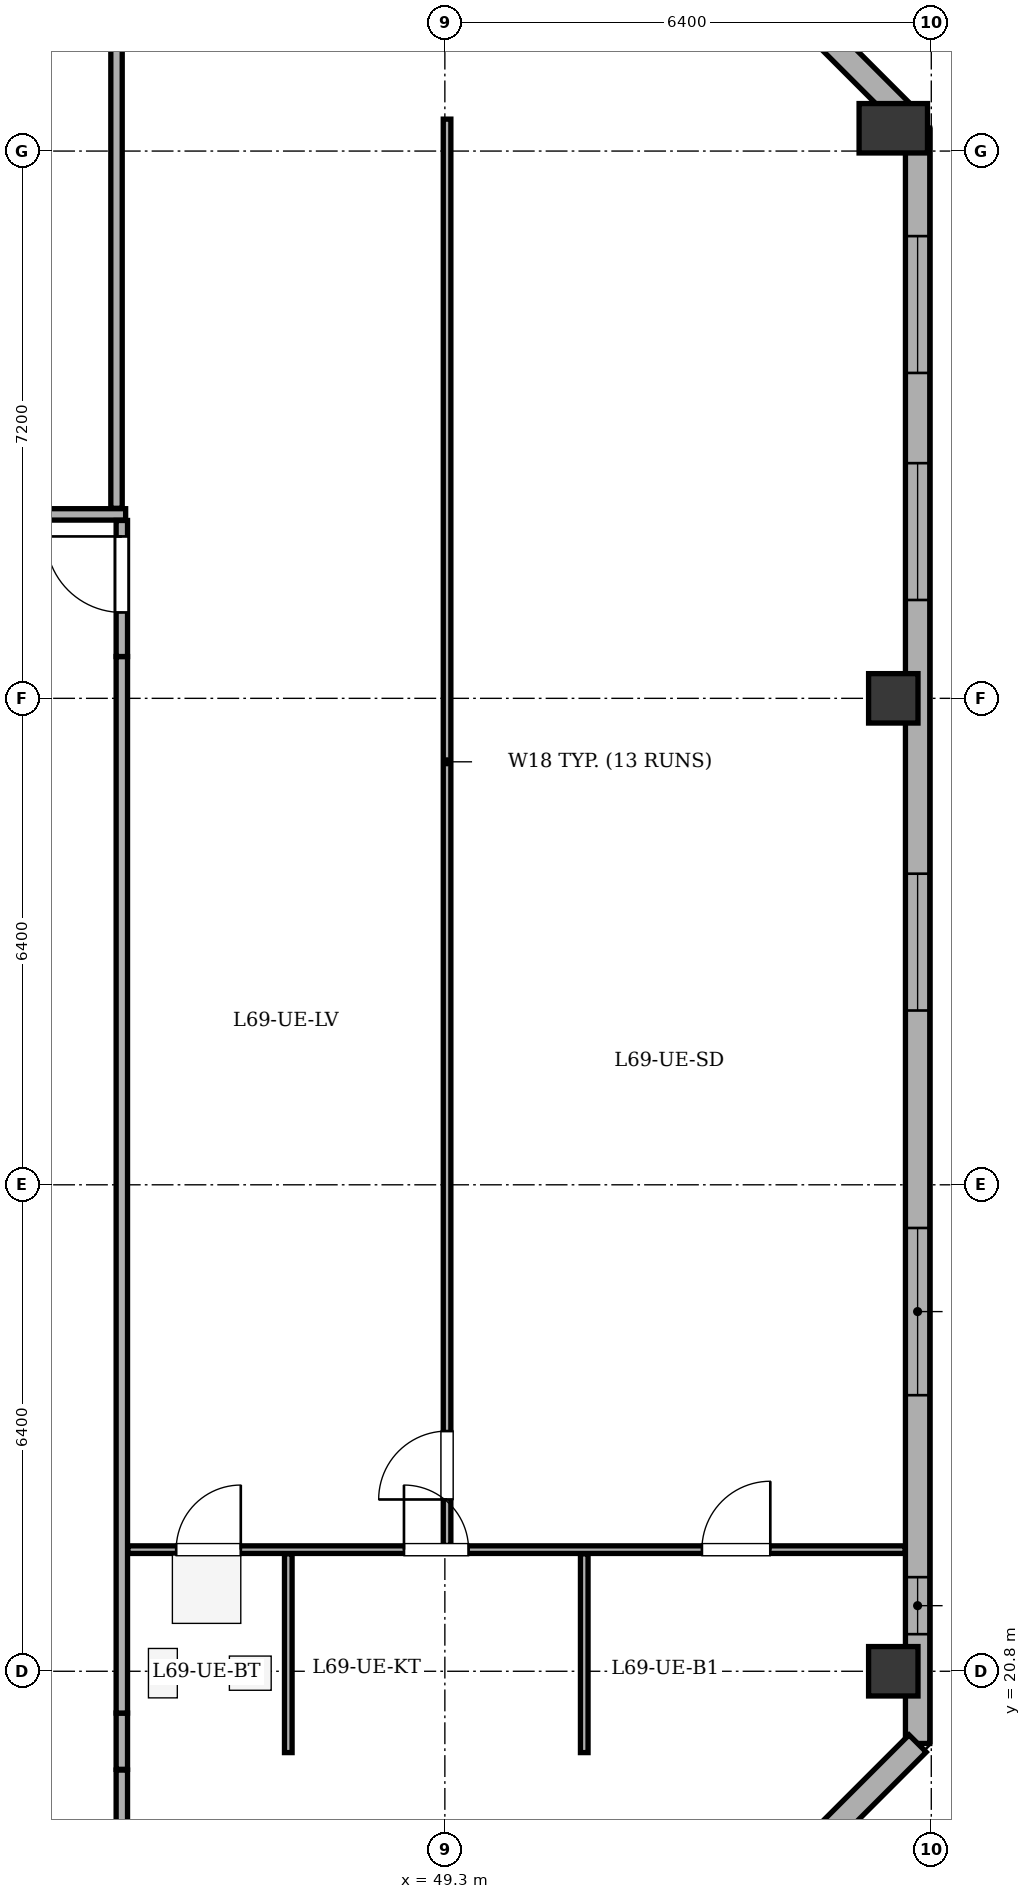
"""IFC4 building model, lengths in metres.
Left out: names, types, materials, properties, quantities, classifications, styles, units other than length and angle.
Written with IfcOpenShell. Run it as: python <this file> out.ifc"""

import sys

from ifc_helpers import new_model, si_unit, direction, frame, frame_2d, origin, origin_2d, place, context, subcontext, project, spatial, rectangle, extrude, element, fill, save


model = new_model("IFC4")
c1 = context("Model", 3, precision=1e-05, world=origin(), true_north=direction((0.0, 1.0)))
c2 = subcontext(c1, "Body", "Model", "MODEL_VIEW")
j1 = project(units=[si_unit("LENGTHUNIT", "METRE"), si_unit("PLANEANGLEUNIT", "RADIAN")], contexts=[c1])
p1 = place(None, origin())
s1 = spatial("IfcSite", under=j1, at=p1, CompositionType="ELEMENT")
p2 = place(p1, origin())
s2 = spatial("IfcBuilding", under=s1, at=p2, CompositionType="ELEMENT")
p3 = place(p2, frame((0.0, 0.0, 261.9)))
s3 = spatial("IfcBuildingStorey", under=s2, at=p3, CompositionType="ELEMENT", Elevation=261.9)
for number, where, z_axis, x_axis in (
    (1, (55.2, 20.8, 0.0), (0.0, 0.0, 1.0), (1.0, 0.0, 0.0)),
    (2, (55.2, 33.6, 0.0), (0.0, 0.0, 1.0), (1.0, 0.0, 0.0)),
):
    element("IfcColumn", number, at=place(p3, frame(where, z_axis=z_axis, x_axis=x_axis)), inside=s3, PredefinedType="COLUMN", context=c2, shape_type="SweptSolid", body=[
        extrude(rectangle(XDim=0.65, YDim=0.65, at=origin_2d()), origin(), (0.0, 0.0, 1.0), 3.4),
    ])
p4 = place(p3, frame((55.2, 41.1, 0.0), z_axis=(0.0, 0.0, 1.0), x_axis=(1.0, 0.0, 0.0)))
e3 = element("IfcColumn", 3, at=p4, inside=s3, PredefinedType="COLUMN", context=c2, shape_type="SweptSolid", body=[
    extrude(rectangle(XDim=0.65, YDim=0.9, at=origin_2d()), origin(), (0.0, 0.0, 1.0), 3.4),
])
p5 = place(p3, frame((51.7, 44.92, 0.0), z_axis=(0.0, 0.0, 1.0), x_axis=(0.70712937715, -0.707084184501, 0.0)))
e4 = element("IfcWall", 4, at=p5, inside=s3, PredefinedType="STANDARD", context=c2, shape_type="SweptSolid", body=[
    extrude(rectangle(XDim=5.402, YDim=0.32, at=frame_2d((2.701, 0.0))), origin(), (0.0, 0.0, 1.0), 2.725),
])
p6 = place(p5, frame((2.001, 0.0, 0.75)))
e5 = element("IfcOpeningElement", 5, at=p6, cuts=e4, PredefinedType="OPENING", context=c2, shape_type="SweptSolid", body=[
    extrude(rectangle(XDim=1.4, YDim=1.65, at=frame_2d((0.7, 0.825))), frame((0.0, 0.17, 0.0), z_axis=(0.0, -1.0, 0.0), x_axis=(1.0, 0.0, 0.0)), (0.0, 0.0, 1.0), 0.34),
])
p7 = place(p3, frame((55.52, 41.1, 0.0), z_axis=(0.0, 0.0, 1.0), x_axis=(0.0, -1.0, 0.0)))
e6 = element("IfcWall", 6, at=p7, inside=s3, PredefinedType="STANDARD", context=c2, shape_type="SweptSolid", body=[
    extrude(rectangle(XDim=21.25, YDim=0.32, at=frame_2d((10.625, 0.0))), origin(), (0.0, 0.0, 1.0), 2.725),
])
p8 = place(p7, frame((1.419, 0.0, 0.75)))
e7 = element("IfcOpeningElement", 7, at=p8, cuts=e6, PredefinedType="OPENING", context=c2, shape_type="SweptSolid", body=[
    extrude(rectangle(XDim=1.8, YDim=1.7, at=frame_2d((0.9, 0.85))), frame((0.0, 0.17, 0.0), z_axis=(0.0, -1.0, 0.0), x_axis=(1.0, 0.0, 0.0)), (0.0, 0.0, 1.0), 0.34),
])
p9 = place(p7, frame((4.406, 0.0, 0.75)))
e8 = element("IfcOpeningElement", 8, at=p9, cuts=e6, PredefinedType="OPENING", context=c2, shape_type="SweptSolid", body=[
    extrude(rectangle(XDim=1.8, YDim=1.7, at=frame_2d((0.9, 0.85))), frame((0.0, 0.17, 0.0), z_axis=(0.0, -1.0, 0.0), x_axis=(1.0, 0.0, 0.0)), (0.0, 0.0, 1.0), 0.34),
])
p10 = place(p7, frame((9.807, 0.0, 0.75)))
e9 = element("IfcOpeningElement", 9, at=p10, cuts=e6, PredefinedType="OPENING", context=c2, shape_type="SweptSolid", body=[
    extrude(rectangle(XDim=1.8, YDim=1.7, at=frame_2d((0.9, 0.85))), frame((0.0, 0.17, 0.0), z_axis=(0.0, -1.0, 0.0), x_axis=(1.0, 0.0, 0.0)), (0.0, 0.0, 1.0), 0.34),
])
p11 = place(p7, frame((14.468, 0.0, 0.75)))
e10 = element("IfcOpeningElement", 10, at=p11, cuts=e6, PredefinedType="OPENING", context=c2, shape_type="SweptSolid", body=[
    extrude(rectangle(XDim=2.2, YDim=1.7, at=frame_2d((1.1, 0.85))), frame((0.0, 0.17, 0.0), z_axis=(0.0, -1.0, 0.0), x_axis=(1.0, 0.0, 0.0)), (0.0, 0.0, 1.0), 0.34),
])
p12 = place(p7, frame((19.062, 0.0, 0.75)))
e11 = element("IfcOpeningElement", 11, at=p12, cuts=e6, PredefinedType="OPENING", context=c2, shape_type="SweptSolid", body=[
    extrude(rectangle(XDim=0.75, YDim=1.45, at=frame_2d((0.375, 0.725))), frame((0.0, 0.17, 0.0), z_axis=(0.0, -1.0, 0.0), x_axis=(1.0, 0.0, 0.0)), (0.0, 0.0, 1.0), 0.34),
])
p13 = place(p3, frame((55.52, 19.85, 0.0), z_axis=(0.0, 0.0, 1.0), x_axis=(-0.707106781187, -0.707106781187, 0.0)))
e12 = element("IfcWall", 12, at=p13, inside=s3, PredefinedType="STANDARD", context=c2, shape_type="SweptSolid", body=[
    extrude(rectangle(XDim=5.402, YDim=0.32, at=frame_2d((2.701, 0.0))), origin(), (0.0, 0.0, 1.0), 2.725),
])
p14 = place(p13, frame((2.001, 0.0, 0.75)))
e13 = element("IfcOpeningElement", 13, at=p14, cuts=e12, PredefinedType="OPENING", context=c2, shape_type="SweptSolid", body=[
    extrude(rectangle(XDim=1.4, YDim=1.65, at=frame_2d((0.7, 0.825))), frame((0.0, 0.17, 0.0), z_axis=(0.0, -1.0, 0.0), x_axis=(1.0, 0.0, 0.0)), (0.0, 0.0, 1.0), 0.34),
])
p15 = place(p3, frame((14.58, 36.02, 0.0), z_axis=(0.0, 0.0, 1.0), x_axis=(1.0, 0.0, 0.0)))
e14 = element("IfcWall", 14, at=p15, inside=s3, PredefinedType="PARTITIONING", context=c2, shape_type="SweptSolid", body=[
    extrude(rectangle(XDim=30.52, YDim=0.15, at=frame_2d((15.26, 0.0))), origin(), (0.0, 0.0, 1.0), 3.1),
])
p16 = place(p15, frame((3.253, 0.0, 0.0)))
e15 = element("IfcOpeningElement", 15, at=p16, cuts=e14, PredefinedType="OPENING", context=c2, shape_type="SweptSolid", body=[
    extrude(rectangle(XDim=1.0, YDim=2.1, at=frame_2d((0.5, 1.05))), frame((0.0, 0.085, 0.0), z_axis=(0.0, -1.0, 0.0), x_axis=(1.0, 0.0, 0.0)), (0.0, 0.0, 1.0), 0.17),
])
p17 = place(p15, frame((10.823, 0.0, 0.0)))
e16 = element("IfcOpeningElement", 16, at=p17, cuts=e14, PredefinedType="OPENING", context=c2, shape_type="SweptSolid", body=[
    extrude(rectangle(XDim=1.0, YDim=2.1, at=frame_2d((0.5, 1.05))), frame((0.0, 0.085, 0.0), z_axis=(0.0, -1.0, 0.0), x_axis=(1.0, 0.0, 0.0)), (0.0, 0.0, 1.0), 0.17),
])
p18 = place(p15, frame((18.697, 0.0, 0.0)))
e17 = element("IfcOpeningElement", 17, at=p18, cuts=e14, PredefinedType="OPENING", context=c2, shape_type="SweptSolid", body=[
    extrude(rectangle(XDim=1.0, YDim=2.1, at=frame_2d((0.5, 1.05))), frame((0.0, 0.085, 0.0), z_axis=(0.0, -1.0, 0.0), x_axis=(1.0, 0.0, 0.0)), (0.0, 0.0, 1.0), 0.17),
])
p19 = place(p15, frame((26.267, 0.0, 0.0)))
e18 = element("IfcOpeningElement", 18, at=p19, cuts=e14, PredefinedType="OPENING", context=c2, shape_type="SweptSolid", body=[
    extrude(rectangle(XDim=1.0, YDim=2.1, at=frame_2d((0.5, 1.05))), frame((0.0, 0.085, 0.0), z_axis=(0.0, -1.0, 0.0), x_axis=(1.0, 0.0, 0.0)), (0.0, 0.0, 1.0), 0.17),
])
p20 = place(p3, frame((44.98, 36.1, 0.0), z_axis=(0.0, 0.0, 1.0), x_axis=(0.0, 1.0, 0.0)))
e19 = element("IfcWall", 19, at=p20, inside=s3, PredefinedType="PARTITIONING", context=c2, shape_type="SweptSolid", body=[
    extrude(rectangle(XDim=8.655, YDim=0.15, at=frame_2d((4.327, 0.0))), origin(), (0.0, 0.0, 1.0), 2.725),
])
p21 = place(p3, frame((45.05, 19.5, 0.0), z_axis=(0.0, 0.0, 1.0), x_axis=(0.0, -1.0, 0.0)))
e20 = element("IfcWall", 20, at=p21, inside=s3, PredefinedType="PARTITIONING", context=c2, shape_type="SweptSolid", body=[
    extrude(rectangle(XDim=0.96, YDim=0.15, at=frame_2d((0.48, 0.0))), origin(), (0.0, 0.0, 1.0), 2.725),
])
p22 = place(p3, frame((45.05, 19.51, 0.0), z_axis=(0.0, 0.0, 1.0), x_axis=(0.0, 1.0, 0.0)))
e21 = element("IfcWall", 21, at=p22, inside=s3, PredefinedType="PARTITIONING", context=c2, shape_type="SweptSolid", body=[
    extrude(rectangle(XDim=0.74, YDim=0.15, at=frame_2d((0.37, 0.0))), origin(), (0.0, 0.0, 1.0), 2.725),
])
p23 = place(p3, frame((45.05, 20.25, 0.0), z_axis=(0.0, 0.0, 1.0), x_axis=(0.0, 1.0, 0.0)))
e22 = element("IfcWall", 22, at=p23, inside=s3, PredefinedType="PARTITIONING", context=c2, shape_type="SweptSolid", body=[
    extrude(rectangle(XDim=13.9, YDim=0.15, at=frame_2d((6.95, 0.0))), origin(), (0.0, 0.0, 1.0), 2.725),
])
p24 = place(p3, frame((45.05, 34.15, 0.0), z_axis=(0.0, 0.0, 1.0), x_axis=(0.0, 1.0, 0.0)))
e23 = element("IfcWall", 23, at=p24, inside=s3, PredefinedType="PARTITIONING", context=c2, shape_type="SweptSolid", body=[
    extrude(rectangle(XDim=1.79, YDim=0.15, at=frame_2d((0.895, 0.0))), origin(), (0.0, 0.0, 1.0), 2.725),
])
p25 = place(p24, frame((0.58, 0.0, 0.0)))
e24 = element("IfcOpeningElement", 24, at=p25, cuts=e23, PredefinedType="OPENING", context=c2, shape_type="SweptSolid", body=[
    extrude(rectangle(XDim=1.0, YDim=2.1, at=frame_2d((0.5, 1.05))), frame((0.0, 0.085, 0.0), z_axis=(0.0, -1.0, 0.0), x_axis=(1.0, 0.0, 0.0)), (0.0, 0.0, 1.0), 0.17),
])
p26 = place(p3, frame((45.13, 22.4, 0.0), z_axis=(0.0, 0.0, 1.0), x_axis=(1.0, 0.0, 0.0)))
e25 = element("IfcWall", 25, at=p26, inside=s3, PredefinedType="PARTITIONING", context=c2, shape_type="SweptSolid", body=[
    extrude(rectangle(XDim=10.225, YDim=0.1, at=frame_2d((5.113, 0.0))), origin(), (0.0, 0.0, 1.0), 3.1),
])
p27 = place(p26, frame((0.635, 0.0, 0.0)))
e26 = element("IfcOpeningElement", 26, at=p27, cuts=e25, PredefinedType="OPENING", context=c2, shape_type="SweptSolid", body=[
    extrude(rectangle(XDim=0.85, YDim=2.05, at=frame_2d((0.425, 1.025))), frame((0.0, 0.06, 0.0), z_axis=(0.0, -1.0, 0.0), x_axis=(1.0, 0.0, 0.0)), (0.0, 0.0, 1.0), 0.12),
])
p28 = place(p26, frame((3.632, 0.0, 0.0)))
e27 = element("IfcOpeningElement", 27, at=p28, cuts=e25, PredefinedType="OPENING", context=c2, shape_type="SweptSolid", body=[
    extrude(rectangle(XDim=0.85, YDim=2.05, at=frame_2d((0.425, 1.025))), frame((0.0, 0.06, 0.0), z_axis=(0.0, -1.0, 0.0), x_axis=(1.0, 0.0, 0.0)), (0.0, 0.0, 1.0), 0.12),
])
p29 = place(p26, frame((7.552, 0.0, 0.0)))
e28 = element("IfcOpeningElement", 28, at=p29, cuts=e25, PredefinedType="OPENING", context=c2, shape_type="SweptSolid", body=[
    extrude(rectangle(XDim=0.9, YDim=2.05, at=frame_2d((0.45, 1.025))), frame((0.0, 0.06, 0.0), z_axis=(0.0, -1.0, 0.0), x_axis=(1.0, 0.0, 0.0)), (0.0, 0.0, 1.0), 0.12),
])
p30 = place(p3, frame((49.329, 22.455, 0.0), z_axis=(0.0, 0.0, 1.0), x_axis=(0.0, 1.0, 0.0)))
e29 = element("IfcWall", 29, at=p30, inside=s3, PredefinedType="PARTITIONING", context=c2, shape_type="SweptSolid", body=[
    extrude(rectangle(XDim=18.765, YDim=0.1, at=frame_2d((9.382, 0.0))), origin(), (0.0, 0.0, 1.0), 2.725),
])
p31 = place(p30, frame((0.605, 0.0, 0.0)))
e30 = element("IfcOpeningElement", 30, at=p31, cuts=e29, PredefinedType="OPENING", context=c2, shape_type="SweptSolid", body=[
    extrude(rectangle(XDim=0.9, YDim=2.05, at=frame_2d((0.45, 1.025))), frame((0.0, 0.06, 0.0), z_axis=(0.0, -1.0, 0.0), x_axis=(1.0, 0.0, 0.0)), (0.0, 0.0, 1.0), 0.12),
])
p32 = place(p3, frame((47.24, 19.73, 0.0), z_axis=(0.0, 0.0, 1.0), x_axis=(0.0, 1.0, 0.0)))
e31 = element("IfcWall", 31, at=p32, inside=s3, PredefinedType="PARTITIONING", context=c2, shape_type="SweptSolid", body=[
    extrude(rectangle(XDim=2.615, YDim=0.1, at=frame_2d((1.308, 0.0))), origin(), (0.0, 0.0, 1.0), 2.725),
])
p33 = place(p3, frame((51.134, 19.73, 0.0), z_axis=(0.0, 0.0, 1.0), x_axis=(0.0, 1.0, 0.0)))
e32 = element("IfcWall", 32, at=p33, inside=s3, PredefinedType="PARTITIONING", context=c2, shape_type="SweptSolid", body=[
    extrude(rectangle(XDim=2.615, YDim=0.1, at=frame_2d((1.308, 0.0))), origin(), (0.0, 0.0, 1.0), 3.1),
])
p34 = place(p8, origin())
e33 = element("IfcWindow", 33, at=p34, inside=s3, PartitioningType="SINGLE_PANEL", PredefinedType="WINDOW", context=c2, shape_type="SweptSolid", body=[
    extrude(rectangle(XDim=1.8, YDim=1.7, at=frame_2d((0.9, 0.85))), frame((0.0, -0.01, 0.0), z_axis=(0.0, -1.0, 0.0), x_axis=(1.0, 0.0, 0.0)), (0.0, 0.0, 1.0), 0.06),
])
fill(e7, e33)
p35 = place(p9, origin())
e34 = element("IfcWindow", 34, at=p35, inside=s3, PartitioningType="SINGLE_PANEL", PredefinedType="WINDOW", context=c2, shape_type="SweptSolid", body=[
    extrude(rectangle(XDim=1.8, YDim=1.7, at=frame_2d((0.9, 0.85))), frame((0.0, -0.01, 0.0), z_axis=(0.0, -1.0, 0.0), x_axis=(1.0, 0.0, 0.0)), (0.0, 0.0, 1.0), 0.06),
])
fill(e8, e34)
p36 = place(p10, origin())
e35 = element("IfcWindow", 35, at=p36, inside=s3, PartitioningType="SINGLE_PANEL", PredefinedType="WINDOW", context=c2, shape_type="SweptSolid", body=[
    extrude(rectangle(XDim=1.8, YDim=1.7, at=frame_2d((0.9, 0.85))), frame((0.0, -0.01, 0.0), z_axis=(0.0, -1.0, 0.0), x_axis=(1.0, 0.0, 0.0)), (0.0, 0.0, 1.0), 0.06),
])
fill(e9, e35)
p37 = place(p11, origin())
e36 = element("IfcWindow", 36, at=p37, inside=s3, PartitioningType="SINGLE_PANEL", PredefinedType="WINDOW", context=c2, shape_type="SweptSolid", body=[
    extrude(rectangle(XDim=2.2, YDim=1.7, at=frame_2d((1.1, 0.85))), frame((0.0, -0.01, 0.0), z_axis=(0.0, -1.0, 0.0), x_axis=(1.0, 0.0, 0.0)), (0.0, 0.0, 1.0), 0.06),
])
fill(e10, e36)
p38 = place(p12, origin())
e37 = element("IfcWindow", 37, at=p38, inside=s3, PartitioningType="SINGLE_PANEL", PredefinedType="WINDOW", context=c2, shape_type="SweptSolid", body=[
    extrude(rectangle(XDim=0.75, YDim=1.45, at=frame_2d((0.375, 0.725))), frame((0.0, -0.01, 0.0), z_axis=(0.0, -1.0, 0.0), x_axis=(1.0, 0.0, 0.0)), (0.0, 0.0, 1.0), 0.06),
])
fill(e11, e37)
p39 = place(p25, origin())
e38 = element("IfcDoor", 38, at=p39, inside=s3, OperationType="SINGLE_SWING_RIGHT", PredefinedType="DOOR", context=c2, shape_type="SweptSolid", body=[
    extrude(rectangle(XDim=1.0, YDim=2.1, at=frame_2d((0.5, 1.05))), frame((0.0, 0.025, 0.0), z_axis=(0.0, -1.0, 0.0), x_axis=(1.0, 0.0, 0.0)), (0.0, 0.0, 1.0), 0.05),
])
fill(e24, e38)
p40 = place(p31, origin())
e39 = element("IfcDoor", 39, at=p40, inside=s3, OperationType="SINGLE_SWING_LEFT", PredefinedType="DOOR", context=c2, shape_type="SweptSolid", body=[
    extrude(rectangle(XDim=0.9, YDim=2.05, at=frame_2d((0.45, 1.025))), frame((0.0, 0.025, 0.0), z_axis=(0.0, -1.0, 0.0), x_axis=(1.0, 0.0, 0.0)), (0.0, 0.0, 1.0), 0.05),
])
fill(e30, e39)
p41 = place(p27, origin())
e40 = element("IfcDoor", 40, at=p41, inside=s3, OperationType="SINGLE_SWING_RIGHT", PredefinedType="DOOR", context=c2, shape_type="SweptSolid", body=[
    extrude(rectangle(XDim=0.85, YDim=2.05, at=frame_2d((0.425, 1.025))), frame((0.0, 0.025, 0.0), z_axis=(0.0, -1.0, 0.0), x_axis=(1.0, 0.0, 0.0)), (0.0, 0.0, 1.0), 0.05),
])
fill(e26, e40)
p42 = place(p28, origin())
e41 = element("IfcDoor", 41, at=p42, inside=s3, OperationType="SINGLE_SWING_LEFT", PredefinedType="DOOR", context=c2, shape_type="SweptSolid", body=[
    extrude(rectangle(XDim=0.85, YDim=2.05, at=frame_2d((0.425, 1.025))), frame((0.0, 0.025, 0.0), z_axis=(0.0, -1.0, 0.0), x_axis=(1.0, 0.0, 0.0)), (0.0, 0.0, 1.0), 0.05),
])
fill(e27, e41)
p43 = place(p29, origin())
e42 = element("IfcDoor", 42, at=p43, inside=s3, OperationType="SINGLE_SWING_RIGHT", PredefinedType="DOOR", context=c2, shape_type="SweptSolid", body=[
    extrude(rectangle(XDim=0.9, YDim=2.05, at=frame_2d((0.45, 1.025))), frame((0.0, 0.025, 0.0), z_axis=(0.0, -1.0, 0.0), x_axis=(1.0, 0.0, 0.0)), (0.0, 0.0, 1.0), 0.05),
])
fill(e28, e42)
save(model, sys.argv[1])
